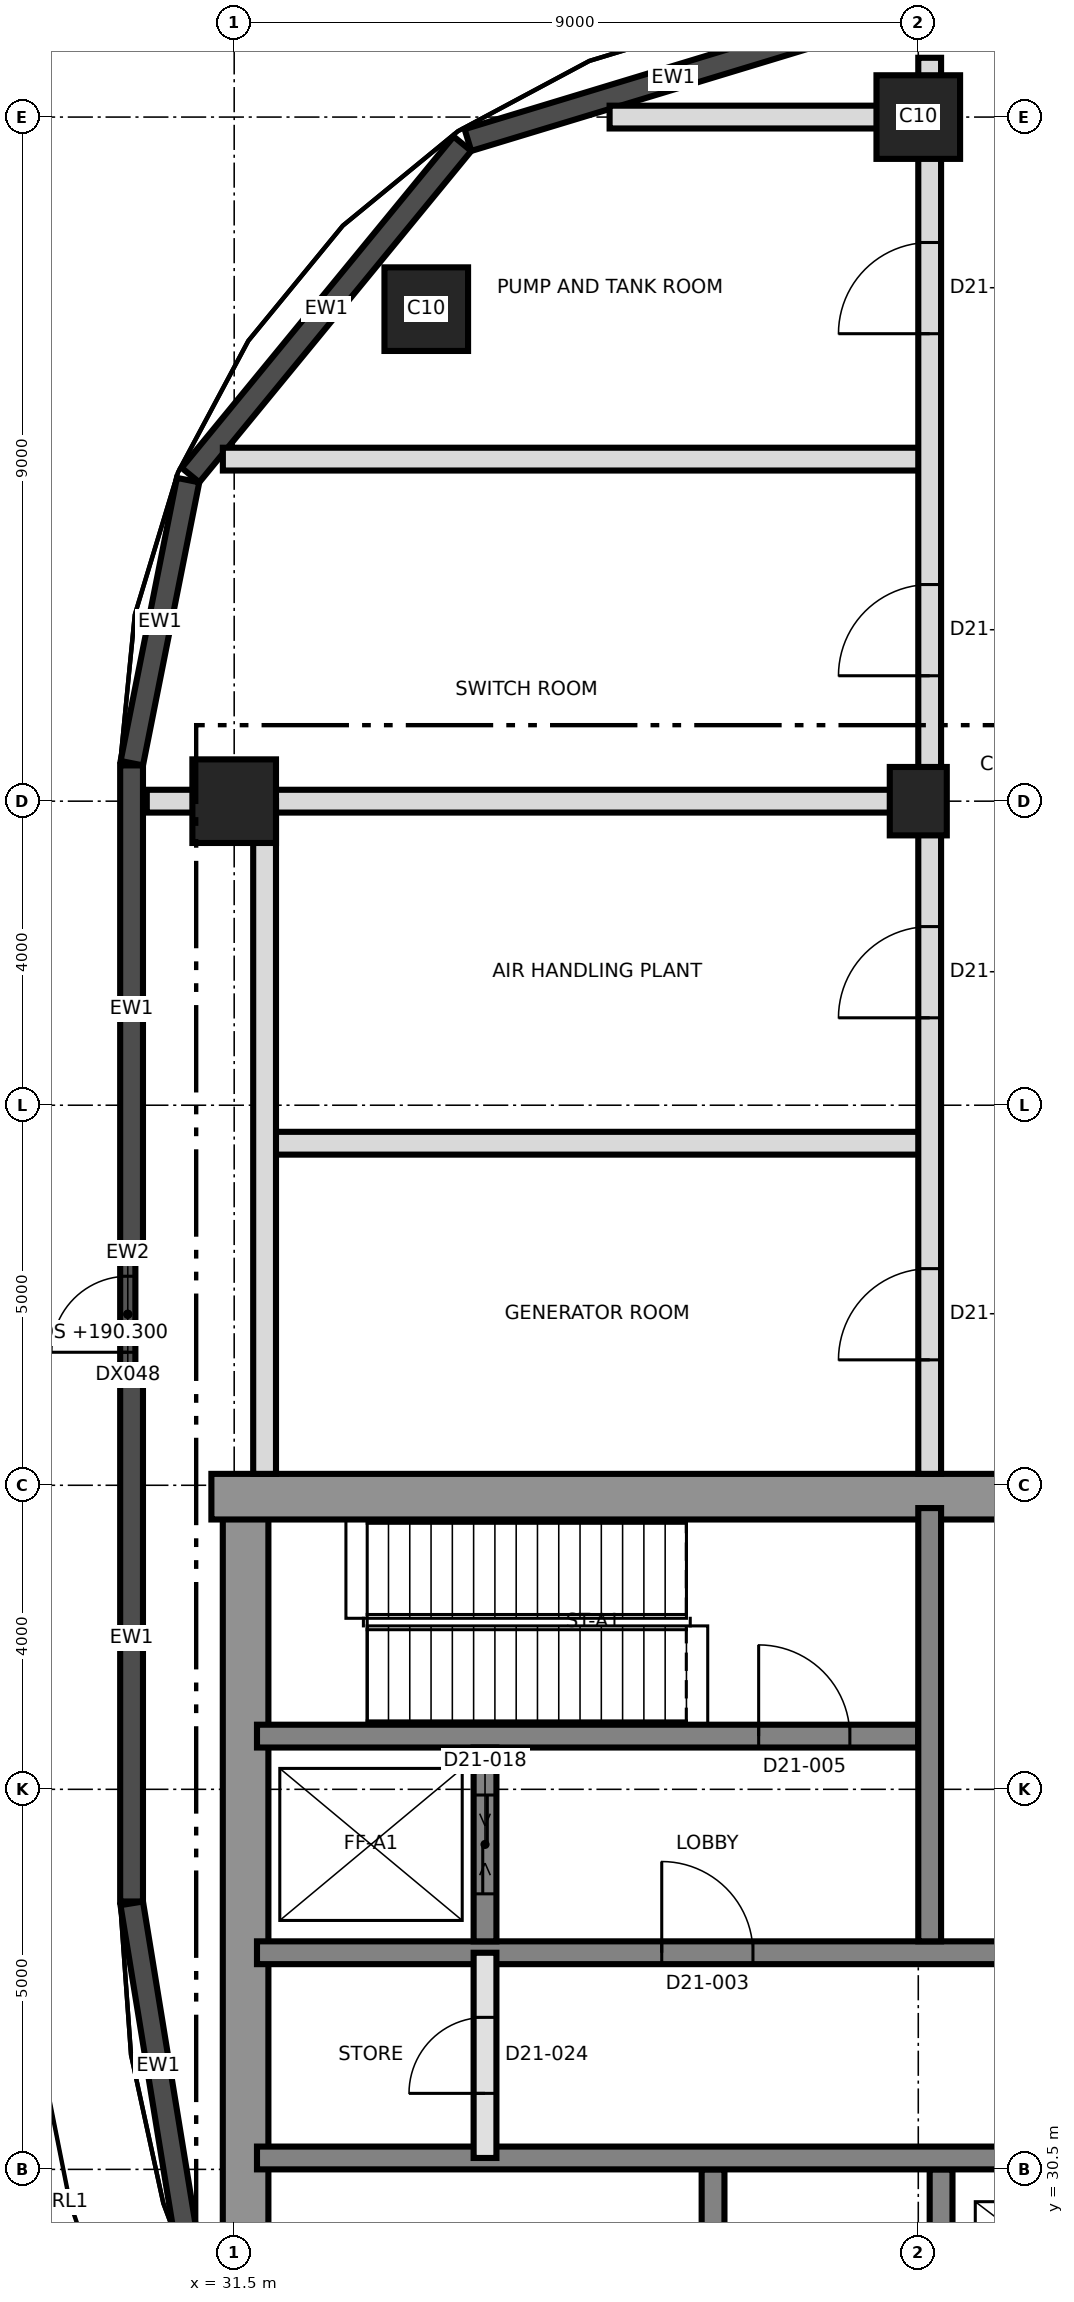
"""IFC4 building model, lengths in metres.
Left out: names, types, materials, properties, quantities, classifications, styles, units other than length and angle.
Written with IfcOpenShell. Run it as: python <this file> out.ifc"""

import sys

from ifc_helpers import new_model, si_unit, direction, frame, frame_2d, origin, origin_2d, place, context, subcontext, project, spatial, rectangle, extrude, element, fill, save


model = new_model("IFC4")
c1 = context("Model", 3, precision=1e-05, world=origin(), true_north=direction((0.0, 1.0)))
c2 = subcontext(c1, "Body", "Model", "MODEL_VIEW")
j1 = project(units=[si_unit("LENGTHUNIT", "METRE"), si_unit("PLANEANGLEUNIT", "RADIAN")], contexts=[c1])
p1 = place(None, origin())
s1 = spatial("IfcSite", under=j1, at=p1, CompositionType="ELEMENT")
p2 = place(p1, origin())
s2 = spatial("IfcBuilding", under=s1, at=p2, CompositionType="ELEMENT")
p3 = place(p2, frame((0.0, 0.0, 190.3)))
s3 = spatial("IfcBuildingStorey", under=s2, at=p3, CompositionType="ELEMENT", Elevation=190.3)
p4 = place(p3, frame((31.65, 21.8, 0.0), z_axis=(0.0, 0.0, 1.0), x_axis=(0.0, 1.0, 0.0)))
e1 = element("IfcWall", 1, at=p4, inside=s3, PredefinedType="SHEAR", context=c2, shape_type="SweptSolid", body=[
    extrude(rectangle(XDim=17.4, YDim=0.6, at=frame_2d((8.7, 0.0))), origin(), (0.0, 0.0, 1.0), 5.5),
])
p5 = place(p3, frame((31.2, 39.35, 0.0), z_axis=(0.0, 0.0, 1.0), x_axis=(1.0, 0.0, 0.0)))
e2 = element("IfcWall", 2, at=p5, inside=s3, PredefinedType="SHEAR", context=c2, shape_type="SweptSolid", body=[
    extrude(rectangle(XDim=27.0, YDim=0.6, at=frame_2d((13.5, 0.0))), origin(), (0.0, 0.0, 1.0), 5.5),
])
p6 = place(p5, frame((10.5, 0.0, 0.0)))
e3 = element("IfcOpeningElement", 3, at=p6, cuts=e2, PredefinedType="OPENING", context=c2, shape_type="SweptSolid", body=[
    extrude(rectangle(XDim=1.2, YDim=2.1, at=frame_2d((0.6, 1.05))), frame((0.0, 0.31, 0.0), z_axis=(0.0, -1.0, 0.0), x_axis=(1.0, 0.0, 0.0)), (0.0, 0.0, 1.0), 0.62),
])
p7 = place(p3, frame((37.8, 21.8, 0.0), z_axis=(0.0, 0.0, 1.0), x_axis=(0.0, 1.0, 0.0)))
e4 = element("IfcWall", 4, at=p7, inside=s3, PredefinedType="SHEAR", context=c2, shape_type="SweptSolid", body=[
    extrude(rectangle(XDim=8.7, YDim=0.3, at=frame_2d((4.35, 0.0))), origin(), (0.0, 0.0, 1.0), 5.5),
])
p8 = place(p7, frame((5.475, 0.0, 0.0)))
e5 = element("IfcOpeningElement", 5, at=p8, cuts=e4, PredefinedType="OPENING", context=c2, shape_type="SweptSolid", body=[
    extrude(rectangle(XDim=1.0, YDim=2.1, at=frame_2d((0.5, 1.05))), frame((0.0, 0.16, 0.0), z_axis=(0.0, -1.0, 0.0), x_axis=(1.0, 0.0, 0.0)), (0.0, 0.0, 1.0), 0.32),
])
p9 = place(p3, frame((40.8, 21.8, 0.0), z_axis=(0.0, 0.0, 1.0), x_axis=(0.0, 1.0, 0.0)))
e6 = element("IfcWall", 6, at=p9, inside=s3, PredefinedType="SHEAR", context=c2, shape_type="SweptSolid", body=[
    extrude(rectangle(XDim=8.7, YDim=0.3, at=frame_2d((4.35, 0.0))), origin(), (0.0, 0.0, 1.0), 5.5),
])
p10 = place(p9, frame((3.85, 0.0, 0.0)))
e7 = element("IfcOpeningElement", 7, at=p10, cuts=e6, PredefinedType="OPENING", context=c2, shape_type="SweptSolid", body=[
    extrude(rectangle(XDim=1.5, YDim=2.1, at=frame_2d((0.75, 1.05))), frame((0.0, 0.16, 0.0), z_axis=(0.0, -1.0, 0.0), x_axis=(1.0, 0.0, 0.0)), (0.0, 0.0, 1.0), 0.32),
])
p11 = place(p3, frame((31.8, 30.65, 0.0), z_axis=(0.0, 0.0, 1.0), x_axis=(1.0, 0.0, 0.0)))
e8 = element("IfcWall", 8, at=p11, inside=s3, PredefinedType="SHEAR", context=c2, shape_type="SweptSolid", body=[
    extrude(rectangle(XDim=26.4, YDim=0.3, at=frame_2d((13.2, 0.0))), origin(), (0.0, 0.0, 1.0), 5.5),
])
p12 = place(p11, frame((24.7, 0.0, 0.0)))
e9 = element("IfcOpeningElement", 9, at=p12, cuts=e8, PredefinedType="OPENING", context=c2, shape_type="SweptSolid", body=[
    extrude(rectangle(XDim=1.0, YDim=2.1, at=frame_2d((0.5, 1.05))), frame((0.0, 0.16, 0.0), z_axis=(0.0, -1.0, 0.0), x_axis=(1.0, 0.0, 0.0)), (0.0, 0.0, 1.0), 0.32),
])
p13 = place(p3, frame((31.8, 33.35, 0.0), z_axis=(0.0, 0.0, 1.0), x_axis=(1.0, 0.0, 0.0)))
e10 = element("IfcWall", 10, at=p13, inside=s3, PredefinedType="SHEAR", context=c2, shape_type="SweptSolid", body=[
    extrude(rectangle(XDim=26.4, YDim=0.3, at=frame_2d((13.2, 0.0))), origin(), (0.0, 0.0, 1.0), 5.5),
])
p14 = place(p13, frame((13.85, 0.0, 0.0)))
e11 = element("IfcOpeningElement", 11, at=p14, cuts=e10, PredefinedType="OPENING", context=c2, shape_type="SweptSolid", body=[
    extrude(rectangle(XDim=1.4, YDim=2.1, at=frame_2d((0.7, 1.05))), frame((0.0, 0.16, 0.0), z_axis=(0.0, -1.0, 0.0), x_axis=(1.0, 0.0, 0.0)), (0.0, 0.0, 1.0), 0.32),
])
p15 = place(p13, frame((5.325, 0.0, 0.0)))
e12 = element("IfcOpeningElement", 12, at=p15, cuts=e10, PredefinedType="OPENING", context=c2, shape_type="SweptSolid", body=[
    extrude(rectangle(XDim=1.2, YDim=2.1, at=frame_2d((0.6, 1.05))), frame((0.0, 0.16, 0.0), z_axis=(0.0, -1.0, 0.0), x_axis=(1.0, 0.0, 0.0)), (0.0, 0.0, 1.0), 0.32),
])
p16 = place(p13, frame((19.875, 0.0, 0.0)))
e13 = element("IfcOpeningElement", 13, at=p16, cuts=e10, PredefinedType="OPENING", context=c2, shape_type="SweptSolid", body=[
    extrude(rectangle(XDim=1.2, YDim=2.1, at=frame_2d((0.6, 1.05))), frame((0.0, 0.16, 0.0), z_axis=(0.0, -1.0, 0.0), x_axis=(1.0, 0.0, 0.0)), (0.0, 0.0, 1.0), 0.32),
])
p17 = place(p3, frame((31.8, 36.2, 0.0), z_axis=(0.0, 0.0, 1.0), x_axis=(1.0, 0.0, 0.0)))
e14 = element("IfcWall", 14, at=p17, inside=s3, PredefinedType="SHEAR", context=c2, shape_type="SweptSolid", body=[
    extrude(rectangle(XDim=8.7, YDim=0.3, at=frame_2d((4.35, 0.0))), origin(), (0.0, 0.0, 1.0), 5.5),
])
p18 = place(p17, frame((6.6, 0.0, 0.0)))
e15 = element("IfcOpeningElement", 15, at=p18, cuts=e14, PredefinedType="OPENING", context=c2, shape_type="SweptSolid", body=[
    extrude(rectangle(XDim=1.2, YDim=2.1, at=frame_2d((0.6, 1.05))), frame((0.0, 0.16, 0.0), z_axis=(0.0, -1.0, 0.0), x_axis=(1.0, 0.0, 0.0)), (0.0, 0.0, 1.0), 0.32),
])
p19 = place(p3, frame((40.65, 33.5, 0.0), z_axis=(0.0, 0.0, 1.0), x_axis=(0.0, 1.0, 0.0)))
e16 = element("IfcWall", 16, at=p19, inside=s3, PredefinedType="SHEAR", context=c2, shape_type="SweptSolid", body=[
    extrude(rectangle(XDim=5.7, YDim=0.3, at=frame_2d((2.85, 0.0))), origin(), (0.0, 0.0, 1.0), 5.5),
])
p20 = place(p3, frame((34.8, 33.5, 0.0), z_axis=(0.0, 0.0, 1.0), x_axis=(0.0, 1.0, 0.0)))
e17 = element("IfcWall", 17, at=p20, inside=s3, PredefinedType="SHEAR", context=c2, shape_type="SweptSolid", body=[
    extrude(rectangle(XDim=2.55, YDim=0.3, at=frame_2d((1.275, 0.0))), origin(), (0.0, 0.0, 1.0), 5.5),
])
p21 = place(p20, frame((0.625, 0.0, 0.0)))
e18 = element("IfcOpeningElement", 18, at=p21, cuts=e17, PredefinedType="OPENING", context=c2, shape_type="SweptSolid", body=[
    extrude(rectangle(XDim=1.3, YDim=2.4, at=frame_2d((0.65, 1.2))), frame((0.0, 0.16, 0.0), z_axis=(0.0, -1.0, 0.0), x_axis=(1.0, 0.0, 0.0)), (0.0, 0.0, 1.0), 0.32),
])
p22 = place(p3, frame((31.5, 48.5, 0.0), z_axis=(0.0, 0.0, 1.0), x_axis=(1.0, 0.0, 0.0)))
e19 = element("IfcColumn", 19, at=p22, inside=s3, PredefinedType="COLUMN", context=c2, shape_type="SweptSolid", body=[
    extrude(rectangle(XDim=1.1, YDim=1.1, at=origin_2d()), origin(), (0.0, 0.0, 1.0), 5.5),
])
p23 = place(p3, frame((40.5, 48.5, 0.0), z_axis=(0.0, 0.0, 1.0), x_axis=(0.0, 1.0, 0.0)))
e20 = element("IfcColumn", 20, at=p23, inside=s3, PredefinedType="COLUMN", context=c2, shape_type="SweptSolid", body=[
    extrude(rectangle(XDim=0.9, YDim=0.75, at=origin_2d()), origin(), (0.0, 0.0, 1.0), 5.5),
])
for number, where, z_axis, x_axis in (
    (21, (34.027, 54.973, 0.0), (0.0, 0.0, 1.0), (1.0, 0.0, 0.0)),
    (22, (40.5, 57.5, 0.0), (0.0, 0.0, 1.0), (1.0, 0.0, 0.0)),
):
    element("IfcColumn", number, at=place(p3, frame(where, z_axis=z_axis, x_axis=x_axis)), inside=s3, PredefinedType="COLUMN", context=c2, shape_type="SweptSolid", body=[
        extrude(rectangle(XDim=1.1, YDim=1.1, at=origin_2d()), origin(), (0.0, 0.0, 1.0), 5.5),
    ])
p24 = place(p3, frame((39.978, 58.836, 0.0), z_axis=(0.0, 0.0, 1.0), x_axis=(-0.956941081769, -0.29028221789, 0.0)))
e23 = element("IfcWall", 23, at=p24, inside=s3, PredefinedType="SOLIDWALL", context=c2, shape_type="SweptSolid", body=[
    extrude(rectangle(XDim=5.646, YDim=0.3, at=frame_2d((2.823, 0.0))), origin(), (0.0, 0.0, 1.0), 5.2),
])
p25 = place(p3, frame((34.502, 57.149, 0.0), z_axis=(0.0, 0.0, 1.0), x_axis=(-0.63439223677, -0.773011312936, 0.0)))
e24 = element("IfcWall", 24, at=p25, inside=s3, PredefinedType="SOLIDWALL", context=c2, shape_type="SweptSolid", body=[
    extrude(rectangle(XDim=5.639, YDim=0.3, at=frame_2d((2.82, 0.0))), origin(), (0.0, 0.0, 1.0), 5.2),
])
p26 = place(p3, frame((30.894, 52.724, 0.0), z_axis=(0.0, 0.0, 1.0), x_axis=(-0.195077379777, -0.980787854686, 0.0)))
e25 = element("IfcWall", 25, at=p26, inside=s3, PredefinedType="SOLIDWALL", context=c2, shape_type="SweptSolid", body=[
    extrude(rectangle(XDim=3.797, YDim=0.3, at=frame_2d((1.898, 0.0))), origin(), (0.0, 0.0, 1.0), 5.2),
])
p27 = place(p3, frame((30.1, 40.95, 0.0), z_axis=(0.0, 0.0, 1.0), x_axis=(0.0, 1.0, 0.0)))
e26 = element("IfcWall", 26, at=p27, inside=s3, PredefinedType="SOLIDWALL", context=c2, shape_type="SweptSolid", body=[
    extrude(rectangle(XDim=1.6, YDim=0.2, at=frame_2d((0.8, 0.0))), origin(), (0.0, 0.0, 1.0), 5.2),
])
p28 = place(p27, frame((0.3, 0.0, 0.0)))
e27 = element("IfcOpeningElement", 27, at=p28, cuts=e26, PredefinedType="OPENING", context=c2, shape_type="SweptSolid", body=[
    extrude(rectangle(XDim=1.0, YDim=2.1, at=frame_2d((0.5, 1.05))), frame((0.0, 0.11, 0.0), z_axis=(0.0, -1.0, 0.0), x_axis=(1.0, 0.0, 0.0)), (0.0, 0.0, 1.0), 0.22),
])
p29 = place(p3, frame((30.15, 48.97, 0.0), z_axis=(0.0, 0.0, 1.0), x_axis=(0.0, -1.0, 0.0)))
e28 = element("IfcWall", 28, at=p29, inside=s3, PredefinedType="SOLIDWALL", context=c2, shape_type="SweptSolid", body=[
    extrude(rectangle(XDim=6.42, YDim=0.3, at=frame_2d((3.21, 0.0))), origin(), (0.0, 0.0, 1.0), 5.2),
])
p30 = place(p3, frame((30.15, 40.95, 0.0), z_axis=(0.0, 0.0, 1.0), x_axis=(0.0, -1.0, 0.0)))
e29 = element("IfcWall", 29, at=p30, inside=s3, PredefinedType="SOLIDWALL", context=c2, shape_type="SweptSolid", body=[
    extrude(rectangle(XDim=6.926, YDim=0.3, at=frame_2d((3.463, 0.0))), origin(), (0.0, 0.0, 1.0), 5.2),
])
p31 = place(p3, frame((30.152, 34.0, 0.0), z_axis=(0.0, 0.0, 1.0), x_axis=(0.160697303067, -0.987003736967, 0.0)))
e30 = element("IfcWall", 30, at=p31, inside=s3, PredefinedType="SOLIDWALL", context=c2, shape_type="SweptSolid", body=[
    extrude(rectangle(XDim=4.333, YDim=0.3, at=frame_2d((2.167, 0.0))), origin(), (0.0, 0.0, 1.0), 5.2),
])
p32 = place(p3, frame((34.8, 30.65, 0.0), z_axis=(0.0, 0.0, 1.0), x_axis=(0.0, 1.0, 0.0)))
e31 = element("IfcWall", 31, at=p32, inside=s3, PredefinedType="SOLIDWALL", context=c2, shape_type="SweptSolid", body=[
    extrude(rectangle(XDim=2.7, YDim=0.3, at=frame_2d((1.35, 0.0))), origin(), (0.0, 0.0, 1.0), 5.2),
])
p33 = place(p32, frame((0.85, 0.0, 0.0)))
e32 = element("IfcOpeningElement", 32, at=p33, cuts=e31, PredefinedType="OPENING", context=c2, shape_type="SweptSolid", body=[
    extrude(rectangle(XDim=1.0, YDim=2.1, at=frame_2d((0.5, 1.05))), frame((0.0, 0.16, 0.0), z_axis=(0.0, -1.0, 0.0), x_axis=(1.0, 0.0, 0.0)), (0.0, 0.0, 1.0), 0.32),
])
p34 = place(p3, frame((31.9, 44.0, 0.0), z_axis=(0.0, 0.0, 1.0), x_axis=(1.0, 0.0, 0.0)))
e33 = element("IfcWall", 33, at=p34, inside=s3, PredefinedType="PARTITIONING", context=c2, shape_type="SweptSolid", body=[
    extrude(rectangle(XDim=8.75, YDim=0.3, at=frame_2d((4.375, 0.0))), origin(), (0.0, 0.0, 1.0), 5.2),
])
p35 = place(p3, frame((30.35, 48.5, 0.0), z_axis=(0.0, 0.0, 1.0), x_axis=(1.0, 0.0, 0.0)))
e34 = element("IfcWall", 34, at=p35, inside=s3, PredefinedType="PARTITIONING", context=c2, shape_type="SweptSolid", body=[
    extrude(rectangle(XDim=10.3, YDim=0.3, at=frame_2d((5.15, 0.0))), origin(), (0.0, 0.0, 1.0), 5.2),
])
p36 = place(p3, frame((31.351, 53.0, 0.0), z_axis=(0.0, 0.0, 1.0), x_axis=(1.0, 0.0, 0.0)))
e35 = element("IfcWall", 35, at=p36, inside=s3, PredefinedType="PARTITIONING", context=c2, shape_type="SweptSolid", body=[
    extrude(rectangle(XDim=9.299, YDim=0.3, at=frame_2d((4.649, 0.0))), origin(), (0.0, 0.0, 1.0), 5.2),
])
p37 = place(p3, frame((36.439, 57.5, 0.0), z_axis=(0.0, 0.0, 1.0), x_axis=(1.0, 0.0, 0.0)))
e36 = element("IfcWall", 36, at=p37, inside=s3, PredefinedType="PARTITIONING", context=c2, shape_type="SweptSolid", body=[
    extrude(rectangle(XDim=4.211, YDim=0.3, at=frame_2d((2.105, 0.0))), origin(), (0.0, 0.0, 1.0), 5.2),
])
p38 = place(p3, frame((31.9, 39.65, 0.0), z_axis=(0.0, 0.0, 1.0), x_axis=(0.0, 1.0, 0.0)))
e37 = element("IfcWall", 37, at=p38, inside=s3, PredefinedType="PARTITIONING", context=c2, shape_type="SweptSolid", body=[
    extrude(rectangle(XDim=8.85, YDim=0.3, at=frame_2d((4.425, 0.0))), origin(), (0.0, 0.0, 1.0), 5.2),
])
p39 = place(p3, frame((40.65, 39.65, 0.0), z_axis=(0.0, 0.0, 1.0), x_axis=(0.0, 1.0, 0.0)))
e38 = element("IfcWall", 38, at=p39, inside=s3, PredefinedType="PARTITIONING", context=c2, shape_type="SweptSolid", body=[
    extrude(rectangle(XDim=18.63, YDim=0.3, at=frame_2d((9.315, 0.0))), origin(), (0.0, 0.0, 1.0), 5.2),
])
p40 = place(p39, frame((1.5, 0.0, 0.0)))
e39 = element("IfcOpeningElement", 39, at=p40, cuts=e38, PredefinedType="OPENING", context=c2, shape_type="SweptSolid", body=[
    extrude(rectangle(XDim=1.2, YDim=2.1, at=frame_2d((0.6, 1.05))), frame((0.0, 0.16, 0.0), z_axis=(0.0, -1.0, 0.0), x_axis=(1.0, 0.0, 0.0)), (0.0, 0.0, 1.0), 0.32),
])
p41 = place(p39, frame((6.0, 0.0, 0.0)))
e40 = element("IfcOpeningElement", 40, at=p41, cuts=e38, PredefinedType="OPENING", context=c2, shape_type="SweptSolid", body=[
    extrude(rectangle(XDim=1.2, YDim=2.1, at=frame_2d((0.6, 1.05))), frame((0.0, 0.16, 0.0), z_axis=(0.0, -1.0, 0.0), x_axis=(1.0, 0.0, 0.0)), (0.0, 0.0, 1.0), 0.32),
])
p42 = place(p39, frame((10.5, 0.0, 0.0)))
e41 = element("IfcOpeningElement", 41, at=p42, cuts=e38, PredefinedType="OPENING", context=c2, shape_type="SweptSolid", body=[
    extrude(rectangle(XDim=1.2, YDim=2.1, at=frame_2d((0.6, 1.05))), frame((0.0, 0.16, 0.0), z_axis=(0.0, -1.0, 0.0), x_axis=(1.0, 0.0, 0.0)), (0.0, 0.0, 1.0), 0.32),
])
p43 = place(p39, frame((15.0, 0.0, 0.0)))
e42 = element("IfcOpeningElement", 42, at=p43, cuts=e38, PredefinedType="OPENING", context=c2, shape_type="SweptSolid", body=[
    extrude(rectangle(XDim=1.2, YDim=2.1, at=frame_2d((0.6, 1.05))), frame((0.0, 0.16, 0.0), z_axis=(0.0, -1.0, 0.0), x_axis=(1.0, 0.0, 0.0)), (0.0, 0.0, 1.0), 0.32),
])
p44 = place(p28, origin())
e43 = element("IfcDoor", 43, at=p44, inside=s3, OperationType="SINGLE_SWING_LEFT", PredefinedType="DOOR", context=c2, shape_type="SweptSolid", body=[
    extrude(rectangle(XDim=1.0, YDim=2.1, at=frame_2d((0.5, 1.05))), frame((0.0, 0.025, 0.0), z_axis=(0.0, -1.0, 0.0), x_axis=(1.0, 0.0, 0.0)), (0.0, 0.0, 1.0), 0.05),
])
fill(e27, e43)
p45 = place(p15, origin())
e44 = element("IfcDoor", 44, at=p45, inside=s3, OperationType="SINGLE_SWING_LEFT", PredefinedType="DOOR", context=c2, shape_type="SweptSolid", body=[
    extrude(rectangle(XDim=1.2, YDim=2.1, at=frame_2d((0.6, 1.05))), frame((0.0, 0.025, 0.0), z_axis=(0.0, -1.0, 0.0), x_axis=(1.0, 0.0, 0.0)), (0.0, 0.0, 1.0), 0.05),
])
fill(e12, e44)
p46 = place(p18, origin())
e45 = element("IfcDoor", 45, at=p46, inside=s3, OperationType="SINGLE_SWING_RIGHT", PredefinedType="DOOR", context=c2, shape_type="SweptSolid", body=[
    extrude(rectangle(XDim=1.2, YDim=2.1, at=frame_2d((0.6, 1.05))), frame((0.0, 0.025, 0.0), z_axis=(0.0, -1.0, 0.0), x_axis=(1.0, 0.0, 0.0)), (0.0, 0.0, 1.0), 0.05),
])
fill(e15, e45)
p47 = place(p21, origin())
e46 = element("IfcDoor", 46, at=p47, inside=s3, OperationType="SLIDING_TO_LEFT", PredefinedType="DOOR", context=c2, shape_type="SweptSolid", body=[
    extrude(rectangle(XDim=1.3, YDim=2.4, at=frame_2d((0.65, 1.2))), frame((0.0, 0.025, 0.0), z_axis=(0.0, -1.0, 0.0), x_axis=(1.0, 0.0, 0.0)), (0.0, 0.0, 1.0), 0.05),
])
fill(e18, e46)
p48 = place(p33, origin())
e47 = element("IfcDoor", 47, at=p48, inside=s3, OperationType="SINGLE_SWING_LEFT", PredefinedType="DOOR", context=c2, shape_type="SweptSolid", body=[
    extrude(rectangle(XDim=1.0, YDim=2.1, at=frame_2d((0.5, 1.05))), frame((0.0, 0.025, 0.0), z_axis=(0.0, -1.0, 0.0), x_axis=(1.0, 0.0, 0.0)), (0.0, 0.0, 1.0), 0.05),
])
fill(e32, e47)
p49 = place(p40, origin())
e48 = element("IfcDoor", 48, at=p49, inside=s3, OperationType="SINGLE_SWING_RIGHT", PredefinedType="DOOR", context=c2, shape_type="SweptSolid", body=[
    extrude(rectangle(XDim=1.2, YDim=2.1, at=frame_2d((0.6, 1.05))), frame((0.0, 0.025, 0.0), z_axis=(0.0, -1.0, 0.0), x_axis=(1.0, 0.0, 0.0)), (0.0, 0.0, 1.0), 0.05),
])
fill(e39, e48)
p50 = place(p41, origin())
e49 = element("IfcDoor", 49, at=p50, inside=s3, OperationType="SINGLE_SWING_LEFT", PredefinedType="DOOR", context=c2, shape_type="SweptSolid", body=[
    extrude(rectangle(XDim=1.2, YDim=2.1, at=frame_2d((0.6, 1.05))), frame((0.0, 0.025, 0.0), z_axis=(0.0, -1.0, 0.0), x_axis=(1.0, 0.0, 0.0)), (0.0, 0.0, 1.0), 0.05),
])
fill(e40, e49)
p51 = place(p42, origin())
e50 = element("IfcDoor", 50, at=p51, inside=s3, OperationType="SINGLE_SWING_LEFT", PredefinedType="DOOR", context=c2, shape_type="SweptSolid", body=[
    extrude(rectangle(XDim=1.2, YDim=2.1, at=frame_2d((0.6, 1.05))), frame((0.0, 0.025, 0.0), z_axis=(0.0, -1.0, 0.0), x_axis=(1.0, 0.0, 0.0)), (0.0, 0.0, 1.0), 0.05),
])
fill(e41, e50)
p52 = place(p43, origin())
e51 = element("IfcDoor", 51, at=p52, inside=s3, OperationType="SINGLE_SWING_LEFT", PredefinedType="DOOR", context=c2, shape_type="SweptSolid", body=[
    extrude(rectangle(XDim=1.2, YDim=2.1, at=frame_2d((0.6, 1.05))), frame((0.0, 0.025, 0.0), z_axis=(0.0, -1.0, 0.0), x_axis=(1.0, 0.0, 0.0)), (0.0, 0.0, 1.0), 0.05),
])
fill(e42, e51)
save(model, sys.argv[1])
